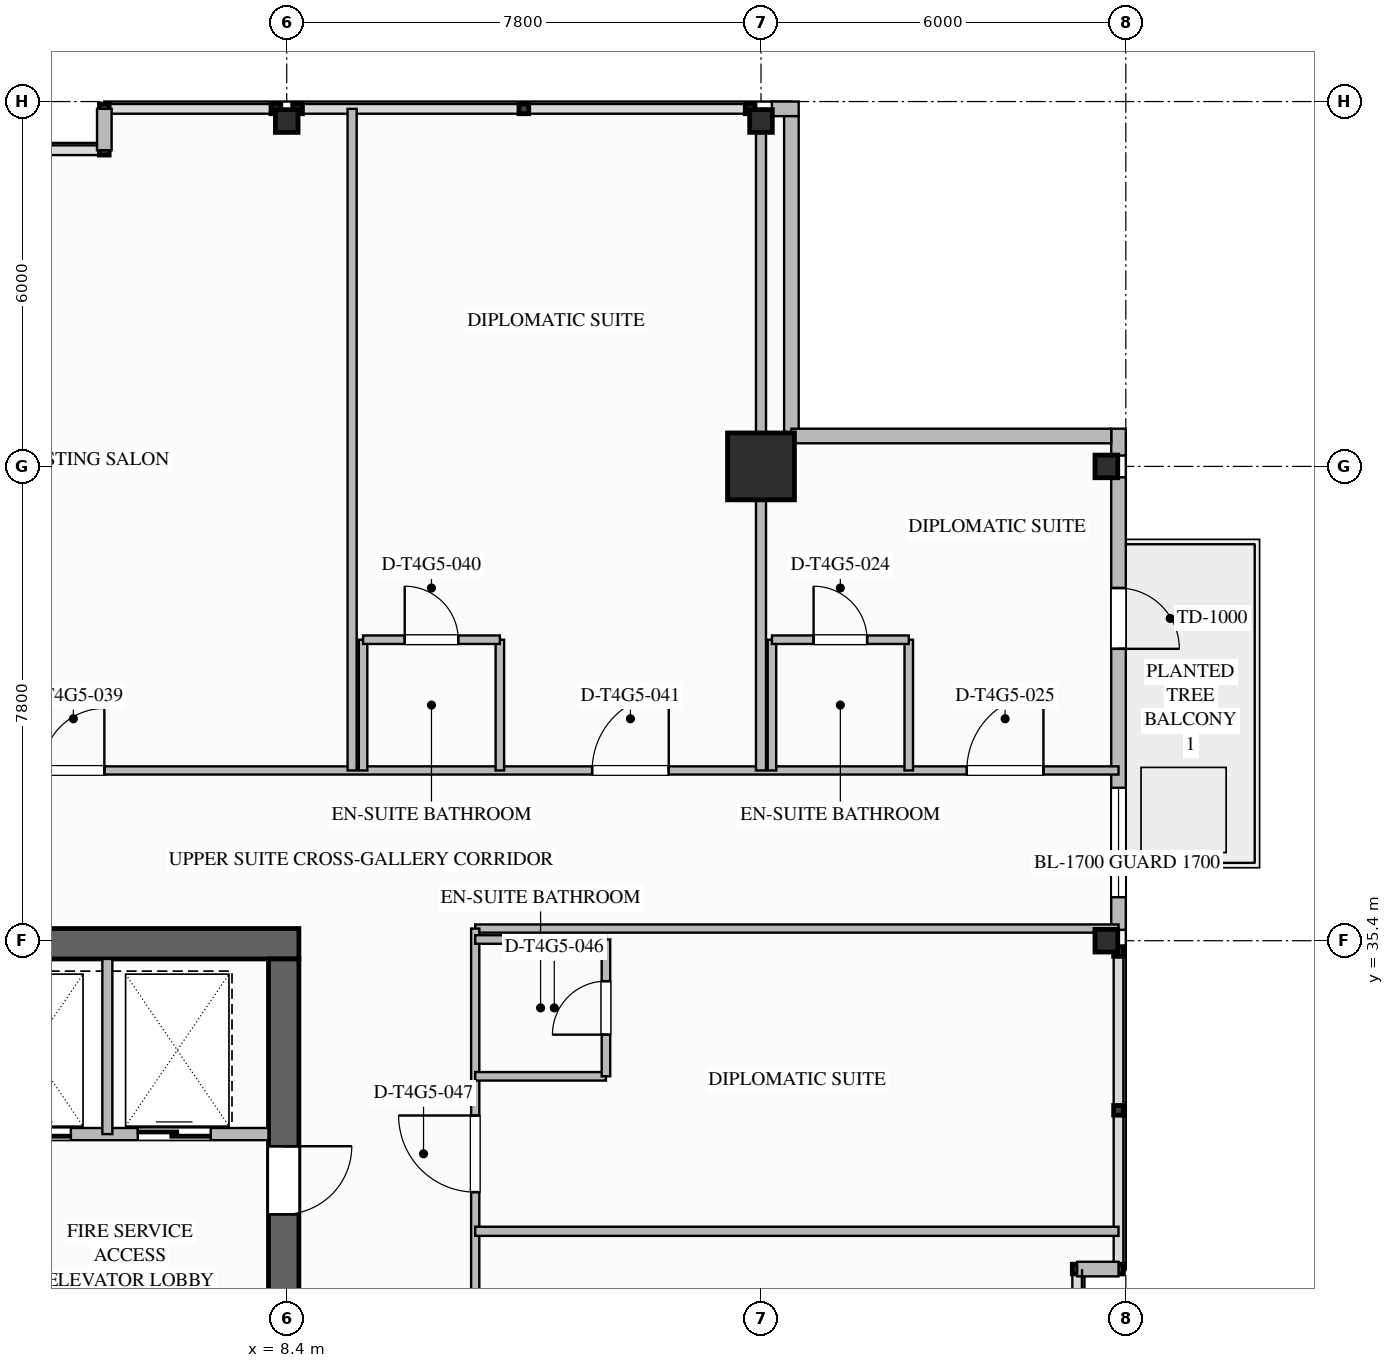
"""IFC4 building model, lengths in metres.
Left out: names, types, materials, properties, quantities, classifications, styles, units other than length and angle.
Written with IfcOpenShell. Run it as: python <this file> out.ifc"""

import sys

from ifc_helpers import new_model, si_unit, direction, frame, frame_2d, origin, origin_2d, place, context, subcontext, project, spatial, rectangle, i_section, extrude, element, fill, save


model = new_model("IFC4")
c1 = context("Model", 3, precision=1e-05, world=origin(), true_north=direction((0.0, 1.0)))
c2 = subcontext(c1, "Body", "Model", "MODEL_VIEW")
j1 = project(units=[si_unit("LENGTHUNIT", "METRE"), si_unit("PLANEANGLEUNIT", "RADIAN")], contexts=[c1])
p1 = place(None, origin())
s1 = spatial("IfcSite", under=j1, at=p1, CompositionType="ELEMENT")
p2 = place(p1, origin())
s2 = spatial("IfcBuilding", under=s1, at=p2, CompositionType="ELEMENT")
p3 = place(p2, frame((0.0, 0.0, 248.3)))
s3 = spatial("IfcBuildingStorey", under=s2, at=p3, CompositionType="ELEMENT", Elevation=248.3)
p4 = place(p3, frame((-8.6, 35.35, 0.0), z_axis=(0.0, 0.0, 1.0), x_axis=(1.0, 0.0, 0.0)))
e1 = element("IfcWall", 1, at=p4, inside=s3, PredefinedType="SHEAR", context=c2, shape_type="SweptSolid", body=[
    extrude(rectangle(XDim=17.2, YDim=0.5, at=frame_2d((8.6, 0.0))), origin(), (0.0, 0.0, 1.0), 3.6),
])
p5 = place(p3, frame((8.35, 35.1, 0.0), z_axis=(0.0, 0.0, 1.0), x_axis=(0.0, -1.0, 0.0)))
e2 = element("IfcWall", 2, at=p5, inside=s3, PredefinedType="SHEAR", context=c2, shape_type="SweptSolid", body=[
    extrude(rectangle(XDim=16.2, YDim=0.5, at=frame_2d((8.1, 0.0))), origin(), (0.0, 0.0, 1.0), 3.6),
])
p6 = place(p5, frame((3.08, 0.0, 0.0)))
e3 = element("IfcOpeningElement", 3, at=p6, cuts=e2, PredefinedType="OPENING", context=c2, shape_type="SweptSolid", body=[
    extrude(rectangle(XDim=1.12, YDim=2.1, at=frame_2d((0.56, 1.05))), frame((0.0, 0.26, 0.0), z_axis=(0.0, -1.0, 0.0), x_axis=(1.0, 0.0, 0.0)), (0.0, 0.0, 1.0), 0.52),
])
p7 = place(p5, frame((10.62, 0.0, 0.0)))
e4 = element("IfcOpeningElement", 4, at=p7, cuts=e2, PredefinedType="OPENING", context=c2, shape_type="SweptSolid", body=[
    extrude(rectangle(XDim=1.08, YDim=2.04, at=frame_2d((0.54, 1.02))), frame((0.0, 0.26, 0.0), z_axis=(0.0, -1.0, 0.0), x_axis=(1.0, 0.0, 0.0)), (0.0, 0.0, 1.0), 0.52),
])
p8 = place(p3, frame((16.2, 43.2, 0.0), z_axis=(0.0, 0.0, 1.0), x_axis=(1.0, 0.0, 0.0)))
e5 = element("IfcColumn", 5, at=p8, inside=s3, PredefinedType="COLUMN", context=c2, shape_type="SweptSolid", body=[
    extrude(rectangle(XDim=1.1, YDim=1.1, at=origin_2d()), origin(), (0.0, 0.0, 1.0), 3.6),
])
for number, where, z_axis, x_axis in (
    (6, (21.88, 35.4, 0.0), (0.0, 0.0, 1.0), (1.0, 0.0, 0.0)),
    (7, (21.88, 43.2, 0.0), (0.0, 0.0, 1.0), (1.0, 0.0, 0.0)),
    (8, (8.4, 48.88, 0.0), (0.0, 0.0, 1.0), (0.0, 1.0, 0.0)),
    (9, (16.2, 48.88, 0.0), (0.0, 0.0, 1.0), (0.0, 1.0, 0.0)),
):
    element("IfcColumn", number, at=place(p3, frame(where, z_axis=z_axis, x_axis=x_axis)), inside=s3, PredefinedType="COLUMN", context=c2, shape_type="SweptSolid", body=[
        extrude(i_section(OverallWidth=0.374, OverallDepth=0.372, WebThickness=0.016, FlangeThickness=0.026, FilletRadius=0.025, at=origin_2d()), origin(), (0.0, 0.0, 1.0), 3.597),
    ])
p9 = place(p3, frame((22.08, 43.022, 0.0), z_axis=(0.0, 0.0, 1.0), x_axis=(0.0, -1.0, 0.0)))
e10 = element("IfcWall", 10, at=p9, inside=s3, PredefinedType="STANDARD", context=c2, shape_type="SweptSolid", body=[
    extrude(rectangle(XDim=7.444, YDim=0.24, at=frame_2d((3.722, 0.0))), origin(), (0.0, 0.0, 1.0), 2.803),
])
p10 = place(p9, frame((1.822, 0.0, 0.0)))
e11 = element("IfcOpeningElement", 11, at=p10, cuts=e10, PredefinedType="OPENING", context=c2, shape_type="SweptSolid", body=[
    extrude(rectangle(XDim=1.0, YDim=2.2, at=frame_2d((0.5, 1.1))), frame((0.0, 0.13, 0.0), z_axis=(0.0, -1.0, 0.0), x_axis=(1.0, 0.0, 0.0)), (0.0, 0.0, 1.0), 0.26),
])
p11 = place(p9, frame((5.107, 0.0, 0.75)))
e12 = element("IfcOpeningElement", 12, at=p11, cuts=e10, PredefinedType="OPENING", context=c2, shape_type="SweptSolid", body=[
    extrude(rectangle(XDim=1.8, YDim=1.953, at=frame_2d((0.9, 0.977))), frame((0.0, 0.13, 0.0), z_axis=(0.0, -1.0, 0.0), x_axis=(1.0, 0.0, 0.0)), (0.0, 0.0, 1.0), 0.26),
])
for number, where, z_axis, x_axis in (
    (13, (22.08, 43.82, 0.0), (0.0, 0.0, 1.0), (0.0, -1.0, 0.0)),
    (14, (16.378, 49.08, 0.0), (0.0, 0.0, 1.0), (1.0, 0.0, 0.0)),
):
    element("IfcWall", number, at=place(p3, frame(where, z_axis=z_axis, x_axis=x_axis)), inside=s3, PredefinedType="STANDARD", context=c2, shape_type="SweptSolid", body=[
        extrude(rectangle(XDim=0.442, YDim=0.24, at=frame_2d((0.221, 0.0))), origin(), (0.0, 0.0, 1.0), 3.34),
    ])
for number, where, z_axis, x_axis in (
    (15, (16.7, 48.96, 0.0), (0.0, 0.0, 1.0), (0.0, -1.0, 0.0)),
    (16, (16.7, 43.7, 0.0), (0.0, 0.0, 1.0), (1.0, 0.0, 0.0)),
):
    element("IfcWall", number, at=place(p3, frame(where, z_axis=z_axis, x_axis=x_axis)), inside=s3, PredefinedType="STANDARD", context=c2, shape_type="SweptSolid", body=[
        extrude(rectangle(XDim=5.26, YDim=0.24, at=frame_2d((2.63, 0.0))), origin(), (0.0, 0.0, 1.0), 3.34),
    ])
for number, where, z_axis, x_axis in (
    (17, (22.08, 30.0, 0.0), (0.0, 0.0, 1.0), (-1.0, 0.0, 0.0)),
    (18, (5.4, 48.4, 0.0), (0.0, 0.0, 1.0), (0.0, 1.0, 0.0)),
):
    element("IfcWall", number, at=place(p3, frame(where, z_axis=z_axis, x_axis=x_axis)), inside=s3, PredefinedType="STANDARD", context=c2, shape_type="SweptSolid", body=[
        extrude(rectangle(XDim=0.68, YDim=0.24, at=frame_2d((0.34, 0.0))), origin(), (0.0, 0.0, 1.0), 3.34),
    ])
p12 = place(p3, frame((3.1, 32.22, 0.0), z_axis=(0.0, 0.0, 1.0), x_axis=(1.0, 0.0, 0.0)))
e19 = element("IfcWall", 19, at=p12, inside=s3, PredefinedType="SOLIDWALL", context=c2, shape_type="SweptSolid", body=[
    extrude(rectangle(XDim=5.0, YDim=0.2, at=frame_2d((2.5, 0.0))), origin(), (0.0, 0.0, 1.0), 3.34),
])
p13 = place(p12, frame((0.55, 0.0, 0.0)))
e20 = element("IfcOpeningElement", 20, at=p13, cuts=e19, PredefinedType="OPENING", context=c2, shape_type="SweptSolid", body=[
    extrude(rectangle(XDim=1.2, YDim=2.2, at=frame_2d((0.6, 1.1))), frame((0.0, 0.11, 0.0), z_axis=(0.0, -1.0, 0.0), x_axis=(1.0, 0.0, 0.0)), (0.0, 0.0, 1.0), 0.22),
])
p14 = place(p12, frame((2.85, 0.0, 0.0)))
e21 = element("IfcOpeningElement", 21, at=p14, cuts=e19, PredefinedType="OPENING", context=c2, shape_type="SweptSolid", body=[
    extrude(rectangle(XDim=1.2, YDim=2.2, at=frame_2d((0.6, 1.1))), frame((0.0, 0.11, 0.0), z_axis=(0.0, -1.0, 0.0), x_axis=(1.0, 0.0, 0.0)), (0.0, 0.0, 1.0), 0.22),
])
p15 = place(p3, frame((5.45, 32.22, 0.0), z_axis=(0.0, 0.0, 1.0), x_axis=(0.0, 1.0, 0.0)))
e22 = element("IfcWall", 22, at=p15, inside=s3, PredefinedType="PARTITIONING", context=c2, shape_type="SweptSolid", body=[
    extrude(rectangle(XDim=2.88, YDim=0.165, at=frame_2d((1.44, 0.0))), origin(), (0.0, 0.0, 1.0), 3.34),
])
p16 = place(p3, frame((-16.2, 38.2, 0.0), z_axis=(0.0, 0.0, 1.0), x_axis=(1.0, 0.0, 0.0)))
e23 = element("IfcWall", 23, at=p16, inside=s3, PredefinedType="PARTITIONING", context=c2, shape_type="SweptSolid", body=[
    extrude(rectangle(XDim=38.28, YDim=0.135, at=frame_2d((19.14, 0.0))), origin(), (0.0, 0.0, 1.0), 3.34),
])
p17 = place(p16, frame((35.785, 0.0, 0.0)))
e24 = element("IfcOpeningElement", 24, at=p17, cuts=e23, PredefinedType="OPENING", context=c2, shape_type="SweptSolid", body=[
    extrude(rectangle(XDim=1.26, YDim=2.2, at=frame_2d((0.63, 1.1))), frame((0.0, 0.077, 0.0), z_axis=(0.0, -1.0, 0.0), x_axis=(1.0, 0.0, 0.0)), (0.0, 0.0, 1.0), 0.155),
])
p18 = place(p16, frame((3.046, 0.0, 0.0)))
e25 = element("IfcOpeningElement", 25, at=p18, cuts=e23, PredefinedType="OPENING", context=c2, shape_type="SweptSolid", body=[
    extrude(rectangle(XDim=1.26, YDim=2.2, at=frame_2d((0.63, 1.1))), frame((0.0, 0.077, 0.0), z_axis=(0.0, -1.0, 0.0), x_axis=(1.0, 0.0, 0.0)), (0.0, 0.0, 1.0), 0.155),
])
p19 = place(p16, frame((12.633, 0.0, 0.0)))
e26 = element("IfcOpeningElement", 26, at=p19, cuts=e23, PredefinedType="OPENING", context=c2, shape_type="SweptSolid", body=[
    extrude(rectangle(XDim=1.02, YDim=2.15, at=frame_2d((0.51, 1.075))), frame((0.0, 0.077, 0.0), z_axis=(0.0, -1.0, 0.0), x_axis=(1.0, 0.0, 0.0)), (0.0, 0.0, 1.0), 0.155),
])
p20 = place(p16, frame((20.581, 0.0, 0.0)))
e27 = element("IfcOpeningElement", 27, at=p20, cuts=e23, PredefinedType="OPENING", context=c2, shape_type="SweptSolid", body=[
    extrude(rectangle(XDim=1.02, YDim=2.15, at=frame_2d((0.51, 1.075))), frame((0.0, 0.077, 0.0), z_axis=(0.0, -1.0, 0.0), x_axis=(1.0, 0.0, 0.0)), (0.0, 0.0, 1.0), 0.155),
])
p21 = place(p16, frame((29.623, 0.0, 0.0)))
e28 = element("IfcOpeningElement", 28, at=p21, cuts=e23, PredefinedType="OPENING", context=c2, shape_type="SweptSolid", body=[
    extrude(rectangle(XDim=1.26, YDim=2.2, at=frame_2d((0.63, 1.1))), frame((0.0, 0.077, 0.0), z_axis=(0.0, -1.0, 0.0), x_axis=(1.0, 0.0, 0.0)), (0.0, 0.0, 1.0), 0.155),
])
p22 = place(p3, frame((11.5, 35.6, 0.0), z_axis=(0.0, 0.0, 1.0), x_axis=(1.0, 0.0, 0.0)))
e29 = element("IfcWall", 29, at=p22, inside=s3, PredefinedType="PARTITIONING", context=c2, shape_type="SweptSolid", body=[
    extrude(rectangle(XDim=10.58, YDim=0.135, at=frame_2d((5.29, 0.0))), origin(), (0.0, 0.0, 1.0), 2.717),
])
p23 = place(p3, frame((11.5, 18.4, 0.0), z_axis=(0.0, 0.0, 1.0), x_axis=(0.0, 1.0, 0.0)))
e30 = element("IfcWall", 30, at=p23, inside=s3, PredefinedType="PARTITIONING", context=c2, shape_type="SweptSolid", body=[
    extrude(rectangle(XDim=17.2, YDim=0.135, at=frame_2d((8.6, 0.0))), origin(), (0.0, 0.0, 1.0), 3.34),
])
p24 = place(p23, frame((0.645, 0.0, 0.0)))
e31 = element("IfcOpeningElement", 31, at=p24, cuts=e30, PredefinedType="OPENING", context=c2, shape_type="SweptSolid", body=[
    extrude(rectangle(XDim=1.26, YDim=2.2, at=frame_2d((0.63, 1.1))), frame((0.0, 0.077, 0.0), z_axis=(0.0, -1.0, 0.0), x_axis=(1.0, 0.0, 0.0)), (0.0, 0.0, 1.0), 0.155),
])
p25 = place(p23, frame((9.185, 0.0, 0.0)))
e32 = element("IfcOpeningElement", 32, at=p25, cuts=e30, PredefinedType="OPENING", context=c2, shape_type="SweptSolid", body=[
    extrude(rectangle(XDim=1.26, YDim=2.2, at=frame_2d((0.63, 1.1))), frame((0.0, 0.077, 0.0), z_axis=(0.0, -1.0, 0.0), x_axis=(1.0, 0.0, 0.0)), (0.0, 0.0, 1.0), 0.155),
])
p26 = place(p23, frame((12.865, 0.0, 0.0)))
e33 = element("IfcOpeningElement", 33, at=p26, cuts=e30, PredefinedType="OPENING", context=c2, shape_type="SweptSolid", body=[
    extrude(rectangle(XDim=1.26, YDim=2.2, at=frame_2d((0.63, 1.1))), frame((0.0, 0.077, 0.0), z_axis=(0.0, -1.0, 0.0), x_axis=(1.0, 0.0, 0.0)), (0.0, 0.0, 1.0), 0.155),
])
p27 = place(p3, frame((16.2, 38.2, 0.0), z_axis=(0.0, 0.0, 1.0), x_axis=(0.0, 1.0, 0.0)))
e34 = element("IfcWall", 34, at=p27, inside=s3, PredefinedType="PARTITIONING", context=c2, shape_type="SweptSolid", body=[
    extrude(rectangle(XDim=10.88, YDim=0.165, at=frame_2d((5.44, 0.0))), origin(), (0.0, 0.0, 1.0), 2.714),
])
p28 = place(p3, frame((16.38, 38.2, 0.0), z_axis=(0.0, 0.0, 1.0), x_axis=(0.0, 1.0, 0.0)))
e35 = element("IfcWall", 35, at=p28, inside=s3, PredefinedType="PLUMBINGWALL", context=c2, shape_type="SweptSolid", body=[
    extrude(rectangle(XDim=2.15, YDim=0.14, at=frame_2d((1.075, 0.0))), origin(), (0.0, 0.0, 1.0), 2.714),
])
p29 = place(p3, frame((18.63, 38.2, 0.0), z_axis=(0.0, 0.0, 1.0), x_axis=(0.0, 1.0, 0.0)))
e36 = element("IfcWall", 36, at=p29, inside=s3, PredefinedType="PLUMBINGWALL", context=c2, shape_type="SweptSolid", body=[
    extrude(rectangle(XDim=2.15, YDim=0.14, at=frame_2d((1.075, 0.0))), origin(), (0.0, 0.0, 1.0), 3.34),
])
p30 = place(p3, frame((16.38, 40.35, 0.0), z_axis=(0.0, 0.0, 1.0), x_axis=(1.0, 0.0, 0.0)))
e37 = element("IfcWall", 37, at=p30, inside=s3, PredefinedType="PLUMBINGWALL", context=c2, shape_type="SweptSolid", body=[
    extrude(rectangle(XDim=2.25, YDim=0.14, at=frame_2d((1.125, 0.0))), origin(), (0.0, 0.0, 1.0), 3.34),
])
p31 = place(p30, frame((0.685, 0.0, 0.0)))
e38 = element("IfcOpeningElement", 38, at=p31, cuts=e37, PredefinedType="OPENING", context=c2, shape_type="SweptSolid", body=[
    extrude(rectangle(XDim=0.88, YDim=2.1, at=frame_2d((0.44, 1.05))), frame((0.0, 0.08, 0.0), z_axis=(0.0, -1.0, 0.0), x_axis=(1.0, 0.0, 0.0)), (0.0, 0.0, 1.0), 0.16),
])
p32 = place(p3, frame((9.476, 38.2, 0.0), z_axis=(0.0, 0.0, 1.0), x_axis=(0.0, 1.0, 0.0)))
e39 = element("IfcWall", 39, at=p32, inside=s3, PredefinedType="PARTITIONING", context=c2, shape_type="SweptSolid", body=[
    extrude(rectangle(XDim=10.88, YDim=0.15, at=frame_2d((5.44, 0.0))), origin(), (0.0, 0.0, 1.0), 3.34),
])
for number, where, z_axis, x_axis in (
    (40, (9.656, 38.2, 0.0), (0.0, 0.0, 1.0), (0.0, 1.0, 0.0)),
    (41, (11.906, 38.2, 0.0), (0.0, 0.0, 1.0), (0.0, 1.0, 0.0)),
):
    element("IfcWall", number, at=place(p3, frame(where, z_axis=z_axis, x_axis=x_axis)), inside=s3, PredefinedType="PLUMBINGWALL", context=c2, shape_type="SweptSolid", body=[
        extrude(rectangle(XDim=2.15, YDim=0.14, at=frame_2d((1.075, 0.0))), origin(), (0.0, 0.0, 1.0), 3.34),
    ])
p33 = place(p3, frame((9.656, 40.35, 0.0), z_axis=(0.0, 0.0, 1.0), x_axis=(1.0, 0.0, 0.0)))
e42 = element("IfcWall", 42, at=p33, inside=s3, PredefinedType="PLUMBINGWALL", context=c2, shape_type="SweptSolid", body=[
    extrude(rectangle(XDim=2.25, YDim=0.14, at=frame_2d((1.125, 0.0))), origin(), (0.0, 0.0, 1.0), 3.34),
])
p34 = place(p33, frame((0.685, 0.0, 0.0)))
e43 = element("IfcOpeningElement", 43, at=p34, cuts=e42, PredefinedType="OPENING", context=c2, shape_type="SweptSolid", body=[
    extrude(rectangle(XDim=0.88, YDim=2.1, at=frame_2d((0.44, 1.05))), frame((0.0, 0.08, 0.0), z_axis=(0.0, -1.0, 0.0), x_axis=(1.0, 0.0, 0.0)), (0.0, 0.0, 1.0), 0.16),
])
p35 = place(p3, frame((11.5, 30.621, 0.0), z_axis=(0.0, 0.0, 1.0), x_axis=(1.0, 0.0, 0.0)))
e44 = element("IfcWall", 44, at=p35, inside=s3, PredefinedType="PARTITIONING", context=c2, shape_type="SweptSolid", body=[
    extrude(rectangle(XDim=10.58, YDim=0.15, at=frame_2d((5.29, 0.0))), origin(), (0.0, 0.0, 1.0), 3.34),
])
p36 = place(p3, frame((11.5, 33.17, 0.0), z_axis=(0.0, 0.0, 1.0), x_axis=(1.0, 0.0, 0.0)))
e45 = element("IfcWall", 45, at=p36, inside=s3, PredefinedType="PLUMBINGWALL", context=c2, shape_type="SweptSolid", body=[
    extrude(rectangle(XDim=2.15, YDim=0.14, at=frame_2d((1.075, 0.0))), origin(), (0.0, 0.0, 1.0), 3.34),
])
p37 = place(p3, frame((11.5, 35.42, 0.0), z_axis=(0.0, 0.0, 1.0), x_axis=(1.0, 0.0, 0.0)))
e46 = element("IfcWall", 46, at=p37, inside=s3, PredefinedType="PLUMBINGWALL", context=c2, shape_type="SweptSolid", body=[
    extrude(rectangle(XDim=2.15, YDim=0.14, at=frame_2d((1.075, 0.0))), origin(), (0.0, 0.0, 1.0), 2.717),
])
p38 = place(p3, frame((13.65, 33.17, 0.0), z_axis=(0.0, 0.0, 1.0), x_axis=(0.0, 1.0, 0.0)))
e47 = element("IfcWall", 47, at=p38, inside=s3, PredefinedType="PLUMBINGWALL", context=c2, shape_type="SweptSolid", body=[
    extrude(rectangle(XDim=2.25, YDim=0.14, at=frame_2d((1.125, 0.0))), origin(), (0.0, 0.0, 1.0), 3.34),
])
p39 = place(p38, frame((0.685, 0.0, 0.0)))
e48 = element("IfcOpeningElement", 48, at=p39, cuts=e47, PredefinedType="OPENING", context=c2, shape_type="SweptSolid", body=[
    extrude(rectangle(XDim=0.88, YDim=2.1, at=frame_2d((0.44, 1.05))), frame((0.0, 0.08, 0.0), z_axis=(0.0, -1.0, 0.0), x_axis=(1.0, 0.0, 0.0)), (0.0, 0.0, 1.0), 0.16),
])
p40 = place(p10, origin())
e49 = element("IfcDoor", 49, at=p40, inside=s3, OperationType="SINGLE_SWING_RIGHT", PredefinedType="DOOR", context=c2, shape_type="SweptSolid", body=[
    extrude(rectangle(XDim=1.0, YDim=2.2, at=frame_2d((0.5, 1.1))), frame((0.0, 0.025, 0.0), z_axis=(0.0, -1.0, 0.0), x_axis=(1.0, 0.0, 0.0)), (0.0, 0.0, 1.0), 0.05),
])
fill(e11, e49)
p41 = place(p11, origin())
e50 = element("IfcWindow", 50, at=p41, inside=s3, PartitioningType="SINGLE_PANEL", PredefinedType="WINDOW", context=c2, shape_type="SweptSolid", body=[
    extrude(rectangle(XDim=1.8, YDim=1.953, at=frame_2d((0.9, 0.977))), frame((0.0, 0.03, 0.0), z_axis=(0.0, -1.0, 0.0), x_axis=(1.0, 0.0, 0.0)), (0.0, 0.0, 1.0), 0.06),
])
fill(e12, e50)
p42 = place(p13, origin())
e51 = element("IfcDoor", 51, at=p42, inside=s3, OperationType="SLIDING_TO_LEFT", PredefinedType="DOOR", context=c2, shape_type="SweptSolid", body=[
    extrude(rectangle(XDim=1.2, YDim=2.2, at=frame_2d((0.6, 1.1))), frame((0.0, 0.025, 0.0), z_axis=(0.0, -1.0, 0.0), x_axis=(1.0, 0.0, 0.0)), (0.0, 0.0, 1.0), 0.05),
])
fill(e20, e51)
p43 = place(p14, origin())
e52 = element("IfcDoor", 52, at=p43, inside=s3, OperationType="SLIDING_TO_LEFT", PredefinedType="DOOR", context=c2, shape_type="SweptSolid", body=[
    extrude(rectangle(XDim=1.2, YDim=2.2, at=frame_2d((0.6, 1.1))), frame((0.0, 0.025, 0.0), z_axis=(0.0, -1.0, 0.0), x_axis=(1.0, 0.0, 0.0)), (0.0, 0.0, 1.0), 0.05),
])
fill(e21, e52)
p44 = place(p6, origin())
e53 = element("IfcDoor", 53, at=p44, inside=s3, OperationType="SINGLE_SWING_LEFT", PredefinedType="DOOR", context=c2, shape_type="SweptSolid", body=[
    extrude(rectangle(XDim=1.12, YDim=2.1, at=frame_2d((0.56, 1.05))), frame((0.0, 0.025, 0.0), z_axis=(0.0, -1.0, 0.0), x_axis=(1.0, 0.0, 0.0)), (0.0, 0.0, 1.0), 0.05),
])
fill(e3, e53)
p45 = place(p31, origin())
e54 = element("IfcDoor", 54, at=p45, inside=s3, OperationType="SINGLE_SWING_LEFT", PredefinedType="DOOR", context=c2, shape_type="SweptSolid", body=[
    extrude(rectangle(XDim=0.88, YDim=2.1, at=frame_2d((0.44, 1.05))), frame((0.0, 0.025, 0.0), z_axis=(0.0, -1.0, 0.0), x_axis=(1.0, 0.0, 0.0)), (0.0, 0.0, 1.0), 0.05),
])
fill(e38, e54)
p46 = place(p17, origin())
e55 = element("IfcDoor", 55, at=p46, inside=s3, OperationType="SINGLE_SWING_RIGHT", PredefinedType="DOOR", context=c2, shape_type="SweptSolid", body=[
    extrude(rectangle(XDim=1.26, YDim=2.2, at=frame_2d((0.63, 1.1))), frame((0.0, 0.025, 0.0), z_axis=(0.0, -1.0, 0.0), x_axis=(1.0, 0.0, 0.0)), (0.0, 0.0, 1.0), 0.05),
])
fill(e24, e55)
p47 = place(p20, origin())
e56 = element("IfcDoor", 56, at=p47, inside=s3, OperationType="SINGLE_SWING_RIGHT", PredefinedType="DOOR", context=c2, shape_type="SweptSolid", body=[
    extrude(rectangle(XDim=1.02, YDim=2.15, at=frame_2d((0.51, 1.075))), frame((0.0, 0.025, 0.0), z_axis=(0.0, -1.0, 0.0), x_axis=(1.0, 0.0, 0.0)), (0.0, 0.0, 1.0), 0.05),
])
fill(e27, e56)
p48 = place(p34, origin())
e57 = element("IfcDoor", 57, at=p48, inside=s3, OperationType="SINGLE_SWING_LEFT", PredefinedType="DOOR", context=c2, shape_type="SweptSolid", body=[
    extrude(rectangle(XDim=0.88, YDim=2.1, at=frame_2d((0.44, 1.05))), frame((0.0, 0.025, 0.0), z_axis=(0.0, -1.0, 0.0), x_axis=(1.0, 0.0, 0.0)), (0.0, 0.0, 1.0), 0.05),
])
fill(e43, e57)
p49 = place(p21, origin())
e58 = element("IfcDoor", 58, at=p49, inside=s3, OperationType="SINGLE_SWING_RIGHT", PredefinedType="DOOR", context=c2, shape_type="SweptSolid", body=[
    extrude(rectangle(XDim=1.26, YDim=2.2, at=frame_2d((0.63, 1.1))), frame((0.0, 0.025, 0.0), z_axis=(0.0, -1.0, 0.0), x_axis=(1.0, 0.0, 0.0)), (0.0, 0.0, 1.0), 0.05),
])
fill(e28, e58)
p50 = place(p39, origin())
e59 = element("IfcDoor", 59, at=p50, inside=s3, OperationType="SINGLE_SWING_LEFT", PredefinedType="DOOR", context=c2, shape_type="SweptSolid", body=[
    extrude(rectangle(XDim=0.88, YDim=2.1, at=frame_2d((0.44, 1.05))), frame((0.0, 0.025, 0.0), z_axis=(0.0, -1.0, 0.0), x_axis=(1.0, 0.0, 0.0)), (0.0, 0.0, 1.0), 0.05),
])
fill(e48, e59)
p51 = place(p26, origin())
e60 = element("IfcDoor", 60, at=p51, inside=s3, OperationType="SINGLE_SWING_RIGHT", PredefinedType="DOOR", context=c2, shape_type="SweptSolid", body=[
    extrude(rectangle(XDim=1.26, YDim=2.2, at=frame_2d((0.63, 1.1))), frame((0.0, 0.025, 0.0), z_axis=(0.0, -1.0, 0.0), x_axis=(1.0, 0.0, 0.0)), (0.0, 0.0, 1.0), 0.05),
])
fill(e33, e60)
save(model, sys.argv[1])
